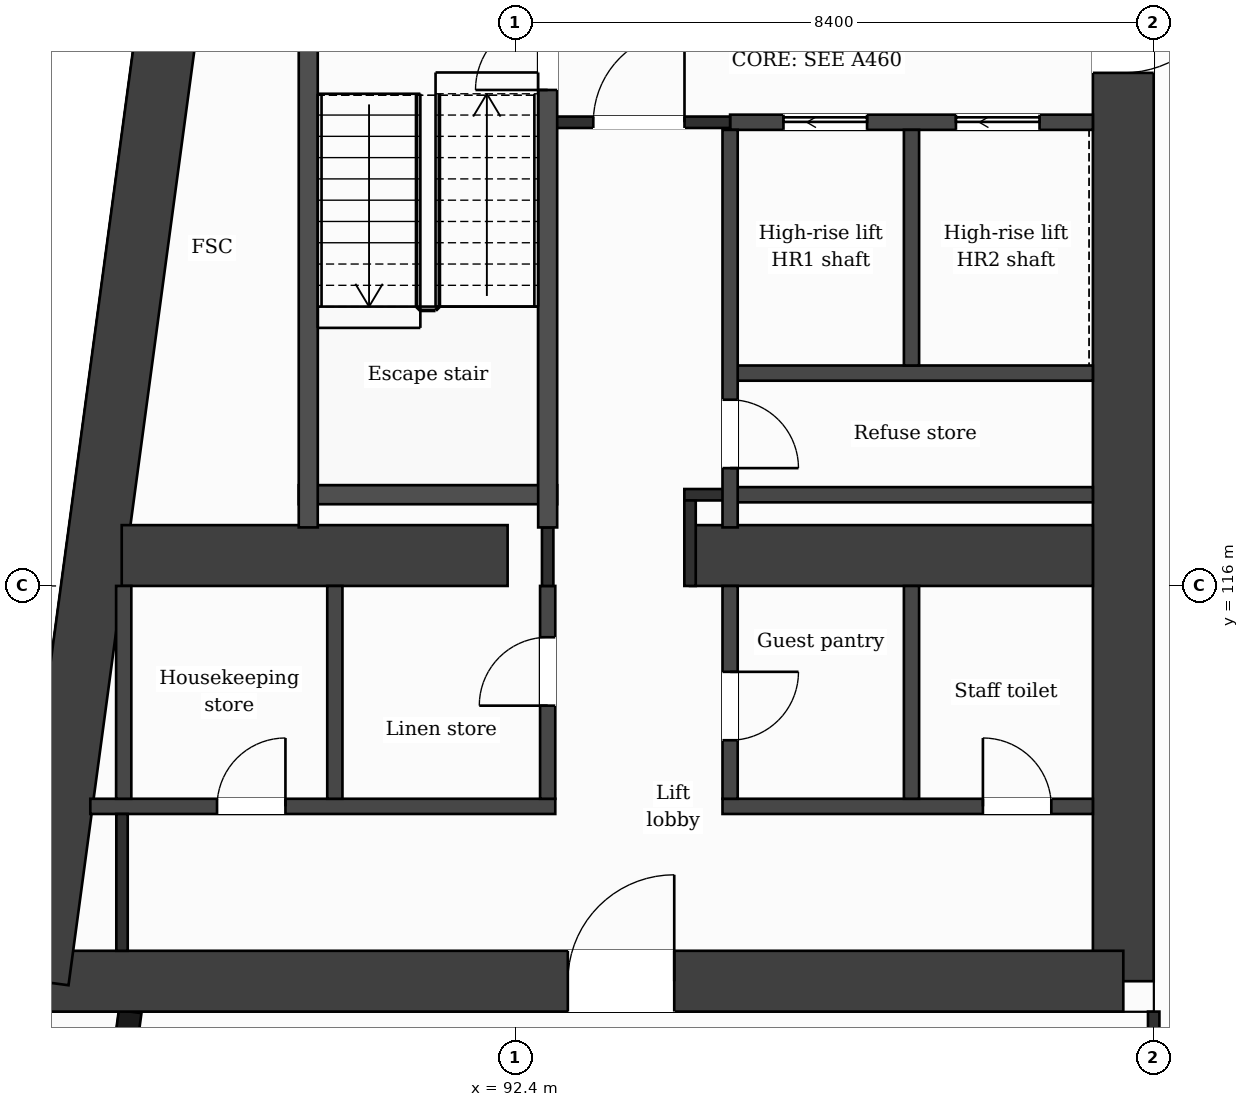
"""IFC4 building model, lengths in metres.
Left out: names, types, materials, properties, quantities, classifications, styles, units other than length and angle.
Written with IfcOpenShell. Run it as: python <this file> out.ifc"""

import sys

from ifc_helpers import new_model, si_unit, direction, frame, frame_2d, origin, place, context, subcontext, project, spatial, rectangle, extrude, element, fill, save


model = new_model("IFC4")
c1 = context("Model", 3, precision=1e-05, world=origin(), true_north=direction((0.0, 1.0)))
c2 = subcontext(c1, "Body", "Model", "MODEL_VIEW")
j1 = project(units=[si_unit("LENGTHUNIT", "METRE"), si_unit("PLANEANGLEUNIT", "RADIAN")], contexts=[c1])
p1 = place(None, origin())
s1 = spatial("IfcSite", under=j1, at=p1, CompositionType="ELEMENT")
p2 = place(p1, origin())
s2 = spatial("IfcBuilding", under=s1, at=p2, CompositionType="ELEMENT")
p3 = place(p2, frame((0.0, 0.0, 242.9)))
s3 = spatial("IfcBuildingStorey", under=s2, at=p3, CompositionType="ELEMENT", Elevation=242.9)
p4 = place(p3, frame((100.4, 132.0, 0.0), z_axis=(0.0, 0.0, 1.0), x_axis=(0.0, -1.0, 0.0)))
e1 = element("IfcWall", 1, at=p4, inside=s3, PredefinedType="SHEAR", context=c2, shape_type="SweptSolid", body=[
    extrude(rectangle(XDim=21.2, YDim=0.8, at=frame_2d((10.6, 0.0))), origin(), (0.0, 0.0, 1.0), 3.7),
])
p5 = place(p4, frame((7.85, 0.0, 0.0)))
e2 = element("IfcOpeningElement", 2, at=p5, cuts=e1, PredefinedType="OPENING", context=c2, shape_type="SweptSolid", body=[
    extrude(rectangle(XDim=1.4, YDim=2.1, at=frame_2d((0.7, 1.05))), frame((0.0, 0.41, 0.0), z_axis=(0.0, -1.0, 0.0), x_axis=(1.0, 0.0, 0.0)), (0.0, 0.0, 1.0), 0.82),
])
p6 = place(p3, frame((100.4, 110.8, 0.0), z_axis=(0.0, 0.0, 1.0), x_axis=(-1.0, 0.0, 0.0)))
e3 = element("IfcWall", 3, at=p6, inside=s3, PredefinedType="SHEAR", context=c2, shape_type="SweptSolid", body=[
    extrude(rectangle(XDim=14.273, YDim=0.8, at=frame_2d((7.137, 0.0))), origin(), (0.0, 0.0, 1.0), 3.7),
])
p7 = place(p6, frame((5.908, 0.0, 0.0)))
e4 = element("IfcOpeningElement", 4, at=p7, cuts=e3, PredefinedType="OPENING", context=c2, shape_type="SweptSolid", body=[
    extrude(rectangle(XDim=1.4, YDim=2.1, at=frame_2d((0.7, 1.05))), frame((0.0, 0.41, 0.0), z_axis=(0.0, -1.0, 0.0), x_axis=(1.0, 0.0, 0.0)), (0.0, 0.0, 1.0), 0.82),
])
p8 = place(p3, frame((86.127, 110.8, 0.0), z_axis=(0.0, 0.0, 1.0), x_axis=(0.133408347329, 0.991061154956, 0.0)))
e5 = element("IfcWall", 5, at=p8, inside=s3, PredefinedType="SHEAR", context=c2, shape_type="SweptSolid", body=[
    extrude(rectangle(XDim=21.391, YDim=0.8, at=frame_2d((10.696, 0.0))), origin(), (0.0, 0.0, 1.0), 3.7),
])
p9 = place(p3, frame((87.223, 116.4, 0.0), z_axis=(0.0, 0.0, 1.0), x_axis=(1.0, 0.0, 0.0)))
e6 = element("IfcWall", 6, at=p9, inside=s3, PredefinedType="SHEAR", context=c2, shape_type="SweptSolid", body=[
    extrude(rectangle(XDim=5.077, YDim=0.8, at=frame_2d((2.539, 0.0))), origin(), (0.0, 0.0, 1.0), 3.7),
])
p10 = place(p3, frame((94.7, 116.4, 0.0), z_axis=(0.0, 0.0, 1.0), x_axis=(1.0, 0.0, 0.0)))
e7 = element("IfcWall", 7, at=p10, inside=s3, PredefinedType="SHEAR", context=c2, shape_type="SweptSolid", body=[
    extrude(rectangle(XDim=5.3, YDim=0.8, at=frame_2d((2.65, 0.0))), origin(), (0.0, 0.0, 1.0), 3.7),
])
p11 = place(p3, frame((87.334, 110.4, 0.0), z_axis=(0.0, 0.0, 1.0), x_axis=(-0.133437175554, -0.991057273915, 0.0)))
e8 = element("IfcWall", 8, at=p11, inside=s3, PredefinedType="SOLIDWALL", context=c2, shape_type="SweptSolid", body=[
    extrude(rectangle(XDim=6.781, YDim=0.3, at=frame_2d((3.39, 0.0))), origin(), (0.0, 0.0, 1.0), 3.2),
])
p12 = place(p11, frame((1.418, 0.0, 0.0)))
e9 = element("IfcOpeningElement", 9, at=p12, cuts=e8, PredefinedType="OPENING", context=c2, shape_type="SweptSolid", body=[
    extrude(rectangle(XDim=1.2, YDim=2.4, at=frame_2d((0.6, 1.2))), frame((0.0, 0.16, 0.0), z_axis=(0.0, -1.0, 0.0), x_axis=(1.0, 0.0, 0.0)), (0.0, 0.0, 1.0), 0.32),
])
p13 = place(p11, frame((4.758, 0.0, 0.9)))
e10 = element("IfcOpeningElement", 10, at=p13, cuts=e8, PredefinedType="OPENING", context=c2, shape_type="SweptSolid", body=[
    extrude(rectangle(XDim=1.2, YDim=2.1, at=frame_2d((0.6, 1.05))), frame((0.0, 0.16, 0.0), z_axis=(0.0, -1.0, 0.0), x_axis=(1.0, 0.0, 0.0)), (0.0, 0.0, 1.0), 0.32),
])
p14 = place(p3, frame((86.81, 113.1, 0.0), z_axis=(0.0, 0.0, 1.0), x_axis=(1.0, 0.0, 0.0)))
e11 = element("IfcWall", 11, at=p14, inside=s3, PredefinedType="PARTITIONING", context=c2, shape_type="SweptSolid", body=[
    extrude(rectangle(XDim=6.117, YDim=0.2, at=frame_2d((3.059, 0.0))), origin(), (0.0, 0.0, 1.0), 3.2),
])
p15 = place(p14, frame((1.667, 0.0, 0.0)))
e12 = element("IfcOpeningElement", 12, at=p15, cuts=e11, PredefinedType="OPENING", context=c2, shape_type="SweptSolid", body=[
    extrude(rectangle(XDim=0.9, YDim=2.1, at=frame_2d((0.45, 1.05))), frame((0.0, 0.11, 0.0), z_axis=(0.0, -1.0, 0.0), x_axis=(1.0, 0.0, 0.0)), (0.0, 0.0, 1.0), 0.22),
])
p16 = place(p3, frame((95.127, 113.1, 0.0), z_axis=(0.0, 0.0, 1.0), x_axis=(1.0, 0.0, 0.0)))
e13 = element("IfcWall", 13, at=p16, inside=s3, PredefinedType="PARTITIONING", context=c2, shape_type="SweptSolid", body=[
    extrude(rectangle(XDim=4.873, YDim=0.2, at=frame_2d((2.437, 0.0))), origin(), (0.0, 0.0, 1.0), 3.2),
])
p17 = place(p16, frame((3.426, 0.0, 0.0)))
e14 = element("IfcOpeningElement", 14, at=p17, cuts=e13, PredefinedType="OPENING", context=c2, shape_type="SweptSolid", body=[
    extrude(rectangle(XDim=0.9, YDim=2.1, at=frame_2d((0.45, 1.05))), frame((0.0, 0.11, 0.0), z_axis=(0.0, -1.0, 0.0), x_axis=(1.0, 0.0, 0.0)), (0.0, 0.0, 1.0), 0.22),
])
p18 = place(p3, frame((95.227, 117.2, 0.0), z_axis=(0.0, 0.0, 1.0), x_axis=(1.0, 0.0, 0.0)))
e15 = element("IfcWall", 15, at=p18, inside=s3, PredefinedType="PARTITIONING", context=c2, shape_type="SweptSolid", body=[
    extrude(rectangle(XDim=4.773, YDim=0.2, at=frame_2d((2.386, 0.0))), origin(), (0.0, 0.0, 1.0), 3.2),
])
p19 = place(p3, frame((94.625, 117.2, 0.0), z_axis=(0.0, 0.0, 1.0), x_axis=(1.0, 0.0, 0.0)))
e16 = element("IfcWall", 16, at=p19, inside=s3, PredefinedType="PARTITIONING", context=c2, shape_type="SweptSolid", body=[
    extrude(rectangle(XDim=0.602, YDim=0.15, at=frame_2d((0.301, 0.0))), origin(), (0.0, 0.0, 1.0), 3.2),
])
p20 = place(p3, frame((89.552, 117.2, 0.0), z_axis=(0.0, 0.0, 1.0), x_axis=(1.0, 0.0, 0.0)))
e17 = element("IfcWall", 17, at=p20, inside=s3, PredefinedType="PARTITIONING", context=c2, shape_type="SweptSolid", body=[
    extrude(rectangle(XDim=3.4, YDim=0.25, at=frame_2d((1.7, 0.0))), origin(), (0.0, 0.0, 1.0), 3.2),
])
p21 = place(p3, frame((95.227, 118.8, 0.0), z_axis=(0.0, 0.0, 1.0), x_axis=(1.0, 0.0, 0.0)))
e18 = element("IfcWall", 18, at=p21, inside=s3, PredefinedType="PARTITIONING", context=c2, shape_type="SweptSolid", body=[
    extrude(rectangle(XDim=4.773, YDim=0.2, at=frame_2d((2.386, 0.0))), origin(), (0.0, 0.0, 1.0), 3.2),
])
p22 = place(p3, frame((95.227, 122.1, 0.0), z_axis=(0.0, 0.0, 1.0), x_axis=(1.0, 0.0, 0.0)))
e19 = element("IfcWall", 19, at=p22, inside=s3, PredefinedType="PARTITIONING", context=c2, shape_type="SweptSolid", body=[
    extrude(rectangle(XDim=4.773, YDim=0.2, at=frame_2d((2.386, 0.0))), origin(), (0.0, 0.0, 1.0), 3.2),
])
p23 = place(p22, frame((0.702, 0.0, 0.0)))
e20 = element("IfcOpeningElement", 20, at=p23, cuts=e19, PredefinedType="OPENING", context=c2, shape_type="SweptSolid", body=[
    extrude(rectangle(XDim=1.1, YDim=2.1, at=frame_2d((0.55, 1.05))), frame((0.0, 0.11, 0.0), z_axis=(0.0, -1.0, 0.0), x_axis=(1.0, 0.0, 0.0)), (0.0, 0.0, 1.0), 0.22),
])
p24 = place(p22, frame((2.971, 0.0, 0.0)))
e21 = element("IfcOpeningElement", 21, at=p24, cuts=e19, PredefinedType="OPENING", context=c2, shape_type="SweptSolid", body=[
    extrude(rectangle(XDim=1.1, YDim=2.1, at=frame_2d((0.55, 1.05))), frame((0.0, 0.11, 0.0), z_axis=(0.0, -1.0, 0.0), x_axis=(1.0, 0.0, 0.0)), (0.0, 0.0, 1.0), 0.22),
])
p25 = place(p3, frame((92.827, 122.1, 0.0), z_axis=(0.0, 0.0, 1.0), x_axis=(1.0, 0.0, 0.0)))
e22 = element("IfcWall", 22, at=p25, inside=s3, PredefinedType="PARTITIONING", context=c2, shape_type="SweptSolid", body=[
    extrude(rectangle(XDim=2.4, YDim=0.15, at=frame_2d((1.2, 0.0))), origin(), (0.0, 0.0, 1.0), 3.2),
])
p26 = place(p25, frame((0.6, 0.0, 0.0)))
e23 = element("IfcOpeningElement", 23, at=p26, cuts=e22, PredefinedType="OPENING", context=c2, shape_type="SweptSolid", body=[
    extrude(rectangle(XDim=1.2, YDim=2.1, at=frame_2d((0.6, 1.05))), frame((0.0, 0.085, 0.0), z_axis=(0.0, -1.0, 0.0), x_axis=(1.0, 0.0, 0.0)), (0.0, 0.0, 1.0), 0.17),
])
p27 = place(p3, frame((87.25, 113.2, 0.0), z_axis=(0.0, 0.0, 1.0), x_axis=(0.0, 1.0, 0.0)))
e24 = element("IfcWall", 24, at=p27, inside=s3, PredefinedType="PARTITIONING", context=c2, shape_type="SweptSolid", body=[
    extrude(rectangle(XDim=2.8, YDim=0.2, at=frame_2d((1.4, 0.0))), origin(), (0.0, 0.0, 1.0), 3.2),
])
p28 = place(p3, frame((87.227, 111.2, 0.0), z_axis=(0.0, 0.0, 1.0), x_axis=(0.0, 1.0, 0.0)))
e25 = element("IfcWall", 25, at=p28, inside=s3, PredefinedType="PARTITIONING", context=c2, shape_type="SweptSolid", body=[
    extrude(rectangle(XDim=1.8, YDim=0.15, at=frame_2d((0.9, 0.0))), origin(), (0.0, 0.0, 1.0), 3.2),
])
p29 = place(p3, frame((89.677, 116.77, 0.0), z_axis=(0.0, 0.0, 1.0), x_axis=(0.0, 1.0, 0.0)))
e26 = element("IfcWall", 26, at=p29, inside=s3, PredefinedType="PARTITIONING", context=c2, shape_type="SweptSolid", body=[
    extrude(rectangle(XDim=7.055, YDim=0.25, at=frame_2d((3.527, 0.0))), origin(), (0.0, 0.0, 1.0), 3.2),
])
p30 = place(p3, frame((90.027, 113.2, 0.0), z_axis=(0.0, 0.0, 1.0), x_axis=(0.0, 1.0, 0.0)))
e27 = element("IfcWall", 27, at=p30, inside=s3, PredefinedType="PARTITIONING", context=c2, shape_type="SweptSolid", body=[
    extrude(rectangle(XDim=2.8, YDim=0.2, at=frame_2d((1.4, 0.0))), origin(), (0.0, 0.0, 1.0), 3.2),
])
p31 = place(p3, frame((92.827, 113.2, 0.0), z_axis=(0.0, 0.0, 1.0), x_axis=(0.0, 1.0, 0.0)))
e28 = element("IfcWall", 28, at=p31, inside=s3, PredefinedType="PARTITIONING", context=c2, shape_type="SweptSolid", body=[
    extrude(rectangle(XDim=2.8, YDim=0.2, at=frame_2d((1.4, 0.0))), origin(), (0.0, 0.0, 1.0), 3.2),
])
p32 = place(p31, frame((1.225, 0.0, 0.0)))
e29 = element("IfcOpeningElement", 29, at=p32, cuts=e28, PredefinedType="OPENING", context=c2, shape_type="SweptSolid", body=[
    extrude(rectangle(XDim=0.9, YDim=2.1, at=frame_2d((0.45, 1.05))), frame((0.0, 0.11, 0.0), z_axis=(0.0, -1.0, 0.0), x_axis=(1.0, 0.0, 0.0)), (0.0, 0.0, 1.0), 0.22),
])
p33 = place(p3, frame((92.827, 116.0, 0.0), z_axis=(0.0, 0.0, 1.0), x_axis=(0.0, 1.0, 0.0)))
e30 = element("IfcWall", 30, at=p33, inside=s3, PredefinedType="PARTITIONING", context=c2, shape_type="SweptSolid", body=[
    extrude(rectangle(XDim=0.77, YDim=0.15, at=frame_2d((0.385, 0.0))), origin(), (0.0, 0.0, 1.0), 3.2),
])
p34 = place(p3, frame((92.827, 116.77, 0.0), z_axis=(0.0, 0.0, 1.0), x_axis=(0.0, 1.0, 0.0)))
e31 = element("IfcWall", 31, at=p34, inside=s3, PredefinedType="PARTITIONING", context=c2, shape_type="SweptSolid", body=[
    extrude(rectangle(XDim=7.055, YDim=0.25, at=frame_2d((3.527, 0.0))), origin(), (0.0, 0.0, 1.0), 3.2),
])
p35 = place(p34, frame((5.755, 0.0, 0.0)))
e32 = element("IfcOpeningElement", 32, at=p35, cuts=e31, PredefinedType="OPENING", context=c2, shape_type="SweptSolid", body=[
    extrude(rectangle(XDim=0.95, YDim=2.1, at=frame_2d((0.475, 1.05))), frame((0.0, 0.135, 0.0), z_axis=(0.0, -1.0, 0.0), x_axis=(1.0, 0.0, 0.0)), (0.0, 0.0, 1.0), 0.27),
])
p36 = place(p3, frame((94.7, 116.0, 0.0), z_axis=(0.0, 0.0, 1.0), x_axis=(0.0, 1.0, 0.0)))
e33 = element("IfcWall", 33, at=p36, inside=s3, PredefinedType="PARTITIONING", context=c2, shape_type="SweptSolid", body=[
    extrude(rectangle(XDim=1.125, YDim=0.15, at=frame_2d((0.562, 0.0))), origin(), (0.0, 0.0, 1.0), 3.2),
])
p37 = place(p3, frame((95.227, 113.2, 0.0), z_axis=(0.0, 0.0, 1.0), x_axis=(0.0, 1.0, 0.0)))
e34 = element("IfcWall", 34, at=p37, inside=s3, PredefinedType="PARTITIONING", context=c2, shape_type="SweptSolid", body=[
    extrude(rectangle(XDim=2.8, YDim=0.2, at=frame_2d((1.4, 0.0))), origin(), (0.0, 0.0, 1.0), 3.2),
])
p38 = place(p37, frame((0.77, 0.0, 0.0)))
e35 = element("IfcOpeningElement", 35, at=p38, cuts=e34, PredefinedType="OPENING", context=c2, shape_type="SweptSolid", body=[
    extrude(rectangle(XDim=0.9, YDim=2.1, at=frame_2d((0.45, 1.05))), frame((0.0, 0.11, 0.0), z_axis=(0.0, -1.0, 0.0), x_axis=(1.0, 0.0, 0.0)), (0.0, 0.0, 1.0), 0.22),
])
p39 = place(p3, frame((95.227, 116.77, 0.0), z_axis=(0.0, 0.0, 1.0), x_axis=(0.0, 1.0, 0.0)))
e36 = element("IfcWall", 36, at=p39, inside=s3, PredefinedType="PARTITIONING", context=c2, shape_type="SweptSolid", body=[
    extrude(rectangle(XDim=5.23, YDim=0.2, at=frame_2d((2.615, 0.0))), origin(), (0.0, 0.0, 1.0), 3.2),
])
p40 = place(p39, frame((0.78, 0.0, 0.0)))
e37 = element("IfcOpeningElement", 37, at=p40, cuts=e36, PredefinedType="OPENING", context=c2, shape_type="SweptSolid", body=[
    extrude(rectangle(XDim=0.9, YDim=2.1, at=frame_2d((0.45, 1.05))), frame((0.0, 0.11, 0.0), z_axis=(0.0, -1.0, 0.0), x_axis=(1.0, 0.0, 0.0)), (0.0, 0.0, 1.0), 0.22),
])
p41 = place(p3, frame((97.614, 113.2, 0.0), z_axis=(0.0, 0.0, 1.0), x_axis=(0.0, 1.0, 0.0)))
e38 = element("IfcWall", 38, at=p41, inside=s3, PredefinedType="PARTITIONING", context=c2, shape_type="SweptSolid", body=[
    extrude(rectangle(XDim=2.8, YDim=0.2, at=frame_2d((1.4, 0.0))), origin(), (0.0, 0.0, 1.0), 3.2),
])
p42 = place(p3, frame((97.614, 118.9, 0.0), z_axis=(0.0, 0.0, 1.0), x_axis=(0.0, 1.0, 0.0)))
e39 = element("IfcWall", 39, at=p42, inside=s3, PredefinedType="PARTITIONING", context=c2, shape_type="SweptSolid", body=[
    extrude(rectangle(XDim=3.1, YDim=0.2, at=frame_2d((1.55, 0.0))), origin(), (0.0, 0.0, 1.0), 3.2),
])
p43 = place(p3, frame((100.8, 109.075, 0.0), z_axis=(0.0, 0.0, 1.0), x_axis=(0.0, 1.0, 0.0)))
e40 = element("IfcWall", 40, at=p43, inside=s3, PredefinedType="PARTITIONING", context=c2, shape_type="SweptSolid", body=[
    extrude(rectangle(XDim=1.325, YDim=0.15, at=frame_2d((0.663, 0.0))), origin(), (0.0, 0.0, 1.0), 3.2),
])
p44 = place(p26, origin())
e41 = element("IfcDoor", 41, at=p44, inside=s3, OperationType="SINGLE_SWING_RIGHT", PredefinedType="DOOR", context=c2, shape_type="SweptSolid", body=[
    extrude(rectangle(XDim=1.2, YDim=2.1, at=frame_2d((0.6, 1.05))), frame((0.0, 0.025, 0.0), z_axis=(0.0, -1.0, 0.0), x_axis=(1.0, 0.0, 0.0)), (0.0, 0.0, 1.0), 0.05),
])
fill(e23, e41)
p45 = place(p23, origin())
e42 = element("IfcDoor", 42, at=p45, inside=s3, OperationType="SLIDING_TO_LEFT", PredefinedType="DOOR", context=c2, shape_type="SweptSolid", body=[
    extrude(rectangle(XDim=1.1, YDim=2.1, at=frame_2d((0.55, 1.05))), frame((0.0, 0.025, 0.0), z_axis=(0.0, -1.0, 0.0), x_axis=(1.0, 0.0, 0.0)), (0.0, 0.0, 1.0), 0.05),
])
fill(e20, e42)
p46 = place(p24, origin())
e43 = element("IfcDoor", 43, at=p46, inside=s3, OperationType="SLIDING_TO_LEFT", PredefinedType="DOOR", context=c2, shape_type="SweptSolid", body=[
    extrude(rectangle(XDim=1.1, YDim=2.1, at=frame_2d((0.55, 1.05))), frame((0.0, 0.025, 0.0), z_axis=(0.0, -1.0, 0.0), x_axis=(1.0, 0.0, 0.0)), (0.0, 0.0, 1.0), 0.05),
])
fill(e21, e43)
p47 = place(p35, origin())
e44 = element("IfcDoor", 44, at=p47, inside=s3, OperationType="SINGLE_SWING_LEFT", PredefinedType="DOOR", context=c2, shape_type="SweptSolid", body=[
    extrude(rectangle(XDim=0.95, YDim=2.1, at=frame_2d((0.475, 1.05))), frame((0.0, 0.025, 0.0), z_axis=(0.0, -1.0, 0.0), x_axis=(1.0, 0.0, 0.0)), (0.0, 0.0, 1.0), 0.05),
])
fill(e32, e44)
p48 = place(p40, origin())
e45 = element("IfcDoor", 45, at=p48, inside=s3, OperationType="SINGLE_SWING_LEFT", PredefinedType="DOOR", context=c2, shape_type="SweptSolid", body=[
    extrude(rectangle(XDim=0.9, YDim=2.1, at=frame_2d((0.45, 1.05))), frame((0.0, 0.025, 0.0), z_axis=(0.0, -1.0, 0.0), x_axis=(1.0, 0.0, 0.0)), (0.0, 0.0, 1.0), 0.05),
])
fill(e37, e45)
p49 = place(p15, origin())
e46 = element("IfcDoor", 46, at=p49, inside=s3, OperationType="SINGLE_SWING_RIGHT", PredefinedType="DOOR", context=c2, shape_type="SweptSolid", body=[
    extrude(rectangle(XDim=0.9, YDim=2.1, at=frame_2d((0.45, 1.05))), frame((0.0, 0.025, 0.0), z_axis=(0.0, -1.0, 0.0), x_axis=(1.0, 0.0, 0.0)), (0.0, 0.0, 1.0), 0.05),
])
fill(e12, e46)
p50 = place(p32, origin())
e47 = element("IfcDoor", 47, at=p50, inside=s3, OperationType="SINGLE_SWING_LEFT", PredefinedType="DOOR", context=c2, shape_type="SweptSolid", body=[
    extrude(rectangle(XDim=0.9, YDim=2.1, at=frame_2d((0.45, 1.05))), frame((0.0, 0.025, 0.0), z_axis=(0.0, -1.0, 0.0), x_axis=(1.0, 0.0, 0.0)), (0.0, 0.0, 1.0), 0.05),
])
fill(e29, e47)
p51 = place(p38, origin())
e48 = element("IfcDoor", 48, at=p51, inside=s3, OperationType="SINGLE_SWING_RIGHT", PredefinedType="DOOR", context=c2, shape_type="SweptSolid", body=[
    extrude(rectangle(XDim=0.9, YDim=2.1, at=frame_2d((0.45, 1.05))), frame((0.0, 0.025, 0.0), z_axis=(0.0, -1.0, 0.0), x_axis=(1.0, 0.0, 0.0)), (0.0, 0.0, 1.0), 0.05),
])
fill(e35, e48)
p52 = place(p17, origin())
e49 = element("IfcDoor", 49, at=p52, inside=s3, OperationType="SINGLE_SWING_LEFT", PredefinedType="DOOR", context=c2, shape_type="SweptSolid", body=[
    extrude(rectangle(XDim=0.9, YDim=2.1, at=frame_2d((0.45, 1.05))), frame((0.0, 0.025, 0.0), z_axis=(0.0, -1.0, 0.0), x_axis=(1.0, 0.0, 0.0)), (0.0, 0.0, 1.0), 0.05),
])
fill(e14, e49)
p53 = place(p7, origin())
e50 = element("IfcDoor", 50, at=p53, inside=s3, OperationType="SINGLE_SWING_LEFT", PredefinedType="DOOR", context=c2, shape_type="SweptSolid", body=[
    extrude(rectangle(XDim=1.4, YDim=2.1, at=frame_2d((0.7, 1.05))), frame((0.0, 0.025, 0.0), z_axis=(0.0, -1.0, 0.0), x_axis=(1.0, 0.0, 0.0)), (0.0, 0.0, 1.0), 0.05),
])
fill(e4, e50)
p54 = place(p5, origin())
e51 = element("IfcDoor", 51, at=p54, inside=s3, OperationType="SINGLE_SWING_LEFT", PredefinedType="DOOR", context=c2, shape_type="SweptSolid", body=[
    extrude(rectangle(XDim=1.4, YDim=2.1, at=frame_2d((0.7, 1.05))), frame((0.0, 0.025, 0.0), z_axis=(0.0, -1.0, 0.0), x_axis=(1.0, 0.0, 0.0)), (0.0, 0.0, 1.0), 0.05),
])
fill(e2, e51)
save(model, sys.argv[1])
